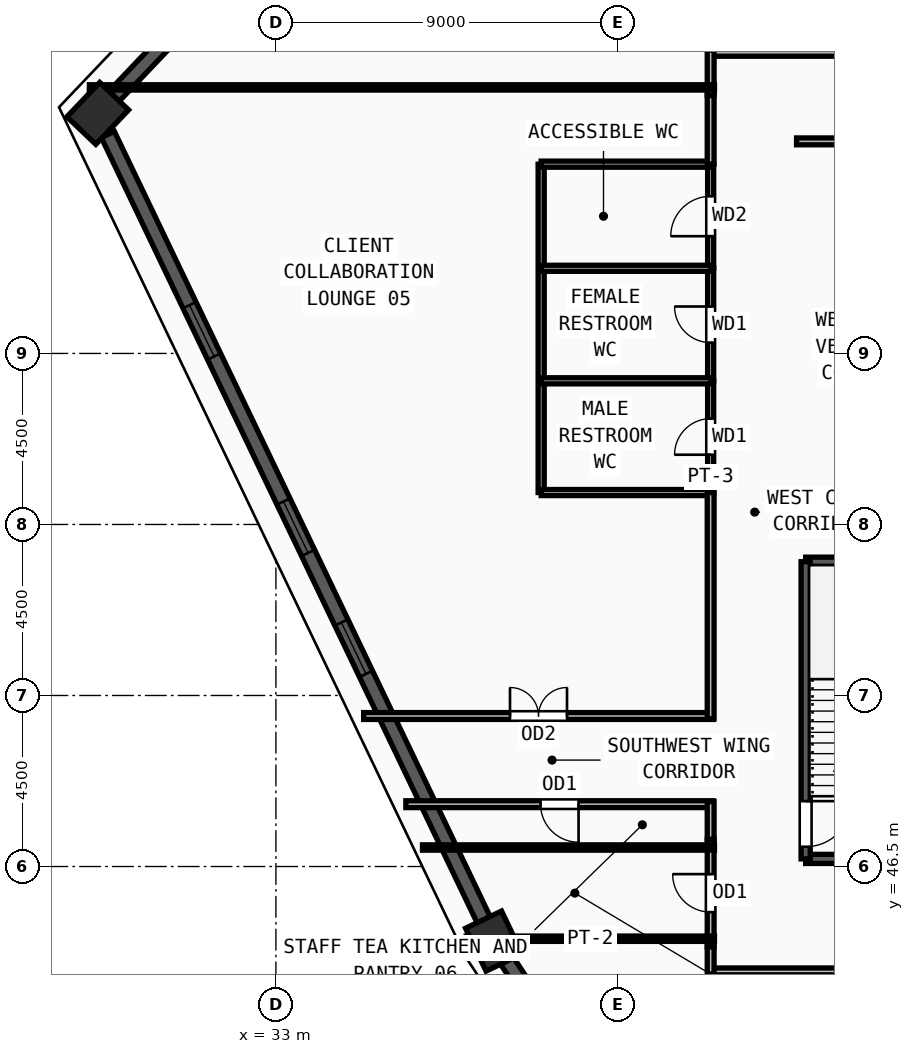
"""IFC4 building model, lengths in metres.
Left out: names, types, materials, properties, quantities, classifications, styles, units other than length and angle.
Written with IfcOpenShell. Run it as: python <this file> out.ifc"""

import sys

from ifc_helpers import new_model, si_unit, direction, frame, frame_2d, origin, origin_2d, place, context, subcontext, project, spatial, rectangle, extrude, source, transform, mapped, element, fill, save


model = new_model("IFC4")
c1 = context("Model", 3, precision=1e-05, world=origin(), true_north=direction((0.0, 1.0)))
c2 = subcontext(c1, "Body", "Model", "MODEL_VIEW")
j1 = project(units=[si_unit("LENGTHUNIT", "METRE"), si_unit("PLANEANGLEUNIT", "RADIAN")], contexts=[c1])
p1 = place(None, origin())
s1 = spatial("IfcSite", under=j1, at=p1, CompositionType="ELEMENT")
p2 = place(p1, origin())
s2 = spatial("IfcBuilding", under=s1, at=p2, CompositionType="ELEMENT")
p3 = place(p2, frame((0.0, 0.0, 258.75)))
s3 = spatial("IfcBuildingStorey", under=s2, at=p3, CompositionType="ELEMENT", Elevation=258.75)
m1 = source(origin(), c2, "Body", "SweptSolid", [
    extrude(rectangle(XDim=1.25, YDim=1.05, at=origin_2d()), origin(), (0.0, 0.0, 1.0), 3.75),
])
for number, where, z_axis, x_axis in (
    (1, (38.734, 44.538, 0.0), (0.0, 0.0, 1.0), (-0.432, 0.902, 0.0)),
    (2, (28.312, 66.317, 0.0), (0.0, 0.0, 1.0), (0.689, 0.724, 0.0)),
):
    element("IfcColumn", number, at=place(p3, frame(where, z_axis=z_axis, x_axis=x_axis)), inside=s3, PredefinedType="COLUMN", context=c2, shape_type="MappedRepresentation", body=[
        mapped(m1, transform((0.0, 0.0, 0.0), x_axis=(1.0, 0.0, 0.0), y_axis=(0.0, 1.0, 0.0), z_axis=(0.0, 0.0, 1.0), scale=1.0)),
    ])
p4 = place(p3, frame((31.559, 69.73, 0.0), z_axis=(0.0, 0.0, 1.0), x_axis=(-0.689302304971, -0.724473831385, 0.0)))
e3 = element("IfcWall", 3, at=p4, inside=s3, PredefinedType="SOLIDWALL", context=c2, shape_type="SweptSolid", body=[
    extrude(rectangle(XDim=4.095, YDim=0.38, at=frame_2d((2.048, 0.0))), origin(), (0.0, 0.0, 1.0), 3.57),
])
p5 = place(p3, frame((28.577, 65.762, 0.0), z_axis=(0.0, 0.0, 1.0), x_axis=(0.431702044432, -0.902016266391, 0.0)))
e4 = element("IfcWall", 4, at=p5, inside=s3, PredefinedType="SOLIDWALL", context=c2, shape_type="SweptSolid", body=[
    extrude(rectangle(XDim=22.914, YDim=0.38, at=frame_2d((11.457, 0.0))), origin(), (0.0, 0.0, 1.0), 3.57),
])
m2 = source(origin(), c2, "Body", "SweptSolid", [
    extrude(rectangle(XDim=1.5, YDim=1.9, at=frame_2d((0.75, 0.95))), frame((0.0, 0.2, 0.0), z_axis=(0.0, -1.0, 0.0), x_axis=(1.0, 0.0, 0.0)), (0.0, 0.0, 1.0), 0.4),
])
p6 = place(p5, frame((4.979, 0.0, 0.55)))
e5 = element("IfcOpeningElement", 5, at=p6, cuts=e4, PredefinedType="OPENING", context=c2, shape_type="MappedRepresentation", body=[
    mapped(m2, transform((0.0, 0.0, 0.0), x_axis=(1.0, 0.0, 0.0), y_axis=(0.0, 1.0, 0.0), z_axis=(0.0, 0.0, 1.0), scale=1.0)),
])
p7 = place(p5, frame((10.707, 0.0, 0.55)))
e6 = element("IfcOpeningElement", 6, at=p7, cuts=e4, PredefinedType="OPENING", context=c2, shape_type="MappedRepresentation", body=[
    mapped(m2, transform((0.0, 0.0, 0.0), x_axis=(1.0, 0.0, 0.0), y_axis=(0.0, 1.0, 0.0), z_axis=(0.0, 0.0, 1.0), scale=1.0)),
])
p8 = place(p5, frame((14.236, 0.0, 0.55)))
e7 = element("IfcOpeningElement", 7, at=p8, cuts=e4, PredefinedType="OPENING", context=c2, shape_type="MappedRepresentation", body=[
    mapped(m2, transform((0.0, 0.0, 0.0), x_axis=(1.0, 0.0, 0.0), y_axis=(0.0, 1.0, 0.0), z_axis=(0.0, 0.0, 1.0), scale=1.0)),
])
p9 = place(p3, frame((39.075, 44.026, 0.0), z_axis=(0.0, 0.0, 1.0), x_axis=(0.554862422202, -0.83194212084, 0.0)))
e8 = element("IfcWall", 8, at=p9, inside=s3, PredefinedType="SOLIDWALL", context=c2, shape_type="SweptSolid", body=[
    extrude(rectangle(XDim=27.782, YDim=0.38, at=frame_2d((13.891, 0.0))), origin(), (0.0, 0.0, 1.0), 3.57),
])
p10 = place(p9, frame((6.195, 0.0, 0.55)))
e9 = element("IfcOpeningElement", 9, at=p10, cuts=e8, PredefinedType="OPENING", context=c2, shape_type="MappedRepresentation", body=[
    mapped(m2, transform((0.0, 0.0, 0.0), x_axis=(1.0, 0.0, 0.0), y_axis=(0.0, 1.0, 0.0), z_axis=(0.0, 0.0, 1.0), scale=1.0)),
])
p11 = place(p9, frame((13.141, 0.0, 0.55)))
e10 = element("IfcOpeningElement", 10, at=p11, cuts=e8, PredefinedType="OPENING", context=c2, shape_type="MappedRepresentation", body=[
    mapped(m2, transform((0.0, 0.0, 0.0), x_axis=(1.0, 0.0, 0.0), y_axis=(0.0, 1.0, 0.0), z_axis=(0.0, 0.0, 1.0), scale=1.0)),
])
p12 = place(p9, frame((20.086, 0.0, 0.55)))
e11 = element("IfcOpeningElement", 11, at=p12, cuts=e8, PredefinedType="OPENING", context=c2, shape_type="MappedRepresentation", body=[
    mapped(m2, transform((0.0, 0.0, 0.0), x_axis=(1.0, 0.0, 0.0), y_axis=(0.0, 1.0, 0.0), z_axis=(0.0, 0.0, 1.0), scale=1.0)),
])
for number, where, z_axis, x_axis in (
    (12, (46.94, 46.7, 0.0), (0.0, 0.0, 1.0), (1.0, 0.0, 0.0)),
    (13, (50.38, 54.52, 0.0), (0.0, 0.0, 1.0), (-1.0, 0.0, 0.0)),
):
    element("IfcWall", number, at=place(p3, frame(where, z_axis=z_axis, x_axis=x_axis)), inside=s3, PredefinedType="SOLIDWALL", context=c2, shape_type="SweptSolid", body=[
        extrude(rectangle(XDim=3.44, YDim=0.24, at=frame_2d((1.72, 0.0))), origin(), (0.0, 0.0, 1.0), 3.57),
    ])
p13 = place(p3, frame((46.94, 54.52, 0.0), z_axis=(0.0, 0.0, 1.0), x_axis=(0.0, -1.0, 0.0)))
e14 = element("IfcWall", 14, at=p13, inside=s3, PredefinedType="SOLIDWALL", context=c2, shape_type="SweptSolid", body=[
    extrude(rectangle(XDim=7.82, YDim=0.24, at=frame_2d((3.91, 0.0))), origin(), (0.0, 0.0, 1.0), 3.57),
])
m3 = source(origin(), c2, "Body", "SweptSolid", [
    extrude(rectangle(XDim=1.2, YDim=2.2, at=frame_2d((0.6, 1.1))), frame((0.0, 0.13, 0.0), z_axis=(0.0, -1.0, 0.0), x_axis=(1.0, 0.0, 0.0)), (0.0, 0.0, 1.0), 0.26),
])
p14 = place(p13, frame((6.3, 0.0, 0.0)))
e15 = element("IfcOpeningElement", 15, at=p14, cuts=e14, PredefinedType="OPENING", context=c2, shape_type="MappedRepresentation", body=[
    mapped(m3, transform((0.0, 0.0, 0.0), x_axis=(1.0, 0.0, 0.0), y_axis=(0.0, 1.0, 0.0), z_axis=(0.0, 0.0, 1.0), scale=1.0)),
])
p15 = place(p3, frame((44.44, 56.34, 0.0), z_axis=(0.0, 0.0, 1.0), x_axis=(0.0, 1.0, 0.0)))
e16 = element("IfcWall", 16, at=p15, inside=s3, PredefinedType="PARTITIONING", context=c2, shape_type="SweptSolid", body=[
    extrude(rectangle(XDim=2.94, YDim=0.16, at=frame_2d((1.47, 0.0))), origin(), (0.0, 0.0, 1.0), 3.57),
])
m4 = source(origin(), c2, "Body", "SweptSolid", [
    extrude(rectangle(XDim=0.95, YDim=2.15, at=frame_2d((0.475, 1.075))), frame((0.0, 0.09, 0.0), z_axis=(0.0, -1.0, 0.0), x_axis=(1.0, 0.0, 0.0)), (0.0, 0.0, 1.0), 0.18),
])
p16 = place(p15, frame((0.995, 0.0, 0.0)))
e17 = element("IfcOpeningElement", 17, at=p16, cuts=e16, PredefinedType="OPENING", context=c2, shape_type="MappedRepresentation", body=[
    mapped(m4, transform((0.0, 0.0, 0.0), x_axis=(1.0, 0.0, 0.0), y_axis=(0.0, 1.0, 0.0), z_axis=(0.0, 0.0, 1.0), scale=1.0)),
])
p17 = place(p3, frame((44.44, 59.28, 0.0), z_axis=(0.0, 0.0, 1.0), x_axis=(0.0, 1.0, 0.0)))
e18 = element("IfcWall", 18, at=p17, inside=s3, PredefinedType="PARTITIONING", context=c2, shape_type="SweptSolid", body=[
    extrude(rectangle(XDim=2.96, YDim=0.16, at=frame_2d((1.48, 0.0))), origin(), (0.0, 0.0, 1.0), 3.57),
])
p18 = place(p17, frame((1.005, 0.0, 0.0)))
e19 = element("IfcOpeningElement", 19, at=p18, cuts=e18, PredefinedType="OPENING", context=c2, shape_type="MappedRepresentation", body=[
    mapped(m4, transform((0.0, 0.0, 0.0), x_axis=(1.0, 0.0, 0.0), y_axis=(0.0, 1.0, 0.0), z_axis=(0.0, 0.0, 1.0), scale=1.0)),
])
p19 = place(p3, frame((44.44, 62.24, 0.0), z_axis=(0.0, 0.0, 1.0), x_axis=(0.0, 1.0, 0.0)))
e20 = element("IfcWall", 20, at=p19, inside=s3, PredefinedType="PARTITIONING", context=c2, shape_type="SweptSolid", body=[
    extrude(rectangle(XDim=2.74, YDim=0.16, at=frame_2d((1.37, 0.0))), origin(), (0.0, 0.0, 1.0), 3.57),
])
m5 = source(origin(), c2, "Body", "SweptSolid", [
    extrude(rectangle(XDim=1.05, YDim=2.15, at=frame_2d((0.525, 1.075))), frame((0.0, 0.09, 0.0), z_axis=(0.0, -1.0, 0.0), x_axis=(1.0, 0.0, 0.0)), (0.0, 0.0, 1.0), 0.18),
])
p20 = place(p19, frame((0.845, 0.0, 0.0)))
e21 = element("IfcOpeningElement", 21, at=p20, cuts=e20, PredefinedType="OPENING", context=c2, shape_type="MappedRepresentation", body=[
    mapped(m5, transform((0.0, 0.0, 0.0), x_axis=(1.0, 0.0, 0.0), y_axis=(0.0, 1.0, 0.0), z_axis=(0.0, 0.0, 1.0), scale=1.0)),
])
p21 = place(p3, frame((46.7, 65.58, 0.0), z_axis=(0.0, 0.0, 1.0), x_axis=(1.0, 0.0, 0.0)))
e22 = element("IfcWall", 22, at=p21, inside=s3, PredefinedType="PARTITIONING", context=c2, shape_type="SweptSolid", body=[
    extrude(rectangle(XDim=3.84, YDim=0.18, at=frame_2d((1.92, 0.0))), origin(), (0.0, 0.0, 1.0), 3.57),
])
m6 = source(origin(), c2, "Body", "SweptSolid", [
    extrude(rectangle(XDim=1.3, YDim=2.2, at=frame_2d((0.65, 1.1))), frame((0.0, 0.1, 0.0), z_axis=(0.0, -1.0, 0.0), x_axis=(1.0, 0.0, 0.0)), (0.0, 0.0, 1.0), 0.2),
])
p22 = place(p21, frame((1.27, 0.0, 0.0)))
e23 = element("IfcOpeningElement", 23, at=p22, cuts=e22, PredefinedType="OPENING", context=c2, shape_type="MappedRepresentation", body=[
    mapped(m6, transform((0.0, 0.0, 0.0), x_axis=(1.0, 0.0, 0.0), y_axis=(0.0, 1.0, 0.0), z_axis=(0.0, 0.0, 1.0), scale=1.0)),
])
p23 = place(p3, frame((44.37, 67.91, 0.0), z_axis=(0.0, 0.0, 1.0), x_axis=(1.0, 0.0, 0.0)))
e24 = element("IfcWall", 24, at=p23, inside=s3, PredefinedType="PARTITIONING", context=c2, shape_type="SweptSolid", body=[
    extrude(rectangle(XDim=18.84, YDim=0.18, at=frame_2d((9.42, 0.0))), origin(), (0.0, 0.0, 1.0), 3.205),
])
m7 = source(origin(), c2, "Body", "SweptSolid", [
    extrude(rectangle(XDim=1.5, YDim=2.2, at=frame_2d((0.75, 1.1))), frame((0.0, 0.1, 0.0), z_axis=(0.0, -1.0, 0.0), x_axis=(1.0, 0.0, 0.0)), (0.0, 0.0, 1.0), 0.2),
])
p24 = place(p23, frame((8.67, 0.0, 0.0)))
e25 = element("IfcOpeningElement", 25, at=p24, cuts=e24, PredefinedType="OPENING", context=c2, shape_type="MappedRepresentation", body=[
    mapped(m7, transform((0.0, 0.0, 0.0), x_axis=(1.0, 0.0, 0.0), y_axis=(0.0, 1.0, 0.0), z_axis=(0.0, 0.0, 1.0), scale=1.0)),
])
p25 = place(p3, frame((35.309, 50.46, 0.0), z_axis=(0.0, 0.0, 1.0), x_axis=(1.0, 0.0, 0.0)))
e26 = element("IfcWall", 26, at=p25, inside=s3, PredefinedType="PARTITIONING", context=c2, shape_type="SweptSolid", body=[
    extrude(rectangle(XDim=9.201, YDim=0.18, at=frame_2d((4.601, 0.0))), origin(), (0.0, 0.0, 1.0), 3.57),
])
p26 = place(p25, frame((3.851, 0.0, 0.0)))
e27 = element("IfcOpeningElement", 27, at=p26, cuts=e26, PredefinedType="OPENING", context=c2, shape_type="MappedRepresentation", body=[
    mapped(m7, transform((0.0, 0.0, 0.0), x_axis=(1.0, 0.0, 0.0), y_axis=(0.0, 1.0, 0.0), z_axis=(0.0, 0.0, 1.0), scale=1.0)),
])
p27 = place(p3, frame((44.51, 48.14, 0.0), z_axis=(0.0, 0.0, 1.0), x_axis=(-1.0, 0.0, 0.0)))
e28 = element("IfcWall", 28, at=p27, inside=s3, PredefinedType="PARTITIONING", context=c2, shape_type="SweptSolid", body=[
    extrude(rectangle(XDim=8.091, YDim=0.18, at=frame_2d((4.045, 0.0))), origin(), (0.0, 0.0, 1.0), 3.57),
])
m8 = source(origin(), c2, "Body", "SweptSolid", [
    extrude(rectangle(XDim=1.0, YDim=2.2, at=frame_2d((0.5, 1.1))), frame((0.0, 0.1, 0.0), z_axis=(0.0, -1.0, 0.0), x_axis=(1.0, 0.0, 0.0)), (0.0, 0.0, 1.0), 0.2),
])
p28 = place(p27, frame((3.546, 0.0, 0.0)))
e29 = element("IfcOpeningElement", 29, at=p28, cuts=e28, PredefinedType="OPENING", context=c2, shape_type="MappedRepresentation", body=[
    mapped(m8, transform((0.0, 0.0, 0.0), x_axis=(1.0, 0.0, 0.0), y_axis=(0.0, 1.0, 0.0), z_axis=(0.0, 0.0, 1.0), scale=1.0)),
])
p29 = place(p3, frame((44.44, 44.385, 0.0), z_axis=(0.0, 0.0, 1.0), x_axis=(0.0, 1.0, 0.0)))
e30 = element("IfcWall", 30, at=p29, inside=s3, PredefinedType="PARTITIONING", context=c2, shape_type="SweptSolid", body=[
    extrude(rectangle(XDim=2.83, YDim=0.18, at=frame_2d((1.415, 0.0))), origin(), (0.0, 0.0, 1.0), 3.57),
])
p30 = place(p29, frame((0.915, 0.0, 0.0)))
e31 = element("IfcOpeningElement", 31, at=p30, cuts=e30, PredefinedType="OPENING", context=c2, shape_type="MappedRepresentation", body=[
    mapped(m8, transform((0.0, 0.0, 0.0), x_axis=(1.0, 0.0, 0.0), y_axis=(0.0, 1.0, 0.0), z_axis=(0.0, 0.0, 1.0), scale=1.0)),
])
p31 = place(p3, frame((75.63, 43.74, 0.0), z_axis=(0.0, 0.0, 1.0), x_axis=(-1.0, 0.0, 0.0)))
e32 = element("IfcWall", 32, at=p31, inside=s3, PredefinedType="PARTITIONING", context=c2, shape_type="SweptSolid", body=[
    extrude(rectangle(XDim=31.26, YDim=0.18, at=frame_2d((15.63, 0.0))), origin(), (0.0, 0.0, 1.0), 3.57),
])
p32 = place(p31, frame((10.38, 0.0, 0.0)))
e33 = element("IfcOpeningElement", 33, at=p32, cuts=e32, PredefinedType="OPENING", context=c2, shape_type="MappedRepresentation", body=[
    mapped(m7, transform((0.0, 0.0, 0.0), x_axis=(1.0, 0.0, 0.0), y_axis=(0.0, 1.0, 0.0), z_axis=(0.0, 0.0, 1.0), scale=1.0)),
])
p33 = place(p3, frame((39.98, 56.34, 0.0), z_axis=(0.0, 0.0, 1.0), x_axis=(0.0, 1.0, 0.0)))
e34 = element("IfcWall", 34, at=p33, inside=s3, PredefinedType="PARTITIONING", context=c2, shape_type="SweptSolid", body=[
    extrude(rectangle(XDim=8.64, YDim=0.16, at=frame_2d((4.32, 0.0))), origin(), (0.0, 0.0, 1.0), 3.57),
])
for number, where, z_axis, x_axis in (
    (35, (39.98, 56.34, 0.0), (0.0, 0.0, 1.0), (1.0, 0.0, 0.0)),
    (36, (39.98, 59.28, 0.0), (0.0, 0.0, 1.0), (1.0, 0.0, 0.0)),
    (37, (39.98, 62.24, 0.0), (0.0, 0.0, 1.0), (1.0, 0.0, 0.0)),
    (38, (39.98, 64.98, 0.0), (0.0, 0.0, 1.0), (1.0, 0.0, 0.0)),
):
    element("IfcWall", number, at=place(p3, frame(where, z_axis=z_axis, x_axis=x_axis)), inside=s3, PredefinedType="PARTITIONING", context=c2, shape_type="SweptSolid", body=[
        extrude(rectangle(XDim=4.46, YDim=0.16, at=frame_2d((2.23, 0.0))), origin(), (0.0, 0.0, 1.0), 3.57),
    ])
p34 = place(p3, frame((44.44, 66.785, 0.0), z_axis=(0.0, 0.0, 1.0), x_axis=(0.0, 1.0, 0.0)))
e39 = element("IfcWall", 39, at=p34, inside=s3, PredefinedType="PARTITIONING", context=c2, shape_type="SweptSolid", body=[
    extrude(rectangle(XDim=1.195, YDim=0.18, at=frame_2d((0.598, 0.0))), origin(), (0.0, 0.0, 1.0), 3.57),
])
p35 = place(p3, frame((44.44, 50.39, 0.0), z_axis=(0.0, 0.0, 1.0), x_axis=(0.0, 1.0, 0.0)))
e40 = element("IfcWall", 40, at=p35, inside=s3, PredefinedType="PARTITIONING", context=c2, shape_type="SweptSolid", body=[
    extrude(rectangle(XDim=5.95, YDim=0.18, at=frame_2d((2.975, 0.0))), origin(), (0.0, 0.0, 1.0), 3.205),
])
p36 = place(p3, frame((44.44, 64.98, 0.0), z_axis=(0.0, 0.0, 1.0), x_axis=(0.0, 1.0, 0.0)))
e41 = element("IfcWall", 41, at=p36, inside=s3, PredefinedType="PARTITIONING", context=c2, shape_type="SweptSolid", body=[
    extrude(rectangle(XDim=1.805, YDim=0.18, at=frame_2d((0.902, 0.0))), origin(), (0.0, 0.0, 1.0), 3.57),
])
p37 = place(p3, frame((44.44, 47.215, 0.0), z_axis=(0.0, 0.0, 1.0), x_axis=(0.0, 1.0, 0.0)))
e42 = element("IfcWall", 42, at=p37, inside=s3, PredefinedType="PARTITIONING", context=c2, shape_type="SweptSolid", body=[
    extrude(rectangle(XDim=0.995, YDim=0.18, at=frame_2d((0.498, 0.0))), origin(), (0.0, 0.0, 1.0), 3.57),
])
p38 = place(p3, frame((44.44, 43.67, 0.0), z_axis=(0.0, 0.0, 1.0), x_axis=(0.0, 1.0, 0.0)))
e43 = element("IfcWall", 43, at=p38, inside=s3, PredefinedType="PARTITIONING", context=c2, shape_type="SweptSolid", body=[
    extrude(rectangle(XDim=0.715, YDim=0.18, at=frame_2d((0.357, 0.0))), origin(), (0.0, 0.0, 1.0), 3.57),
])
p39 = place(p3, frame((44.54, 44.6, 0.0), z_axis=(0.0, 0.0, 1.0), x_axis=(-1.0, 0.0, 0.0)))
e44 = element("IfcWall", 44, at=p39, inside=s3, PredefinedType="PARTITIONING", context=c2, shape_type="SweptSolid", body=[
    extrude(rectangle(XDim=6.534, YDim=0.14, at=frame_2d((3.267, 0.0))), origin(), (0.0, 0.0, 1.0), 3.57),
])
p40 = place(p3, frame((44.54, 47.0, 0.0), z_axis=(0.0, 0.0, 1.0), x_axis=(-1.0, 0.0, 0.0)))
e45 = element("IfcWall", 45, at=p40, inside=s3, PredefinedType="PARTITIONING", context=c2, shape_type="SweptSolid", body=[
    extrude(rectangle(XDim=7.683, YDim=0.14, at=frame_2d((3.842, 0.0))), origin(), (0.0, 0.0, 1.0), 3.57),
])
p41 = place(p3, frame((44.54, 67.0, 0.0), z_axis=(0.0, 0.0, 1.0), x_axis=(-1.0, 0.0, 0.0)))
e46 = element("IfcWall", 46, at=p41, inside=s3, PredefinedType="PARTITIONING", context=c2, shape_type="SweptSolid", body=[
    extrude(rectangle(XDim=16.449, YDim=0.14, at=frame_2d((8.225, 0.0))), origin(), (0.0, 0.0, 1.0), 3.57),
])
m9 = source(origin(), c2, "Body", "SweptSolid", [
    extrude(rectangle(XDim=1.5, YDim=1.9, at=frame_2d((0.75, 0.95))), frame((0.0, 0.03, 0.0), z_axis=(0.0, -1.0, 0.0), x_axis=(1.0, 0.0, 0.0)), (0.0, 0.0, 1.0), 0.06),
])
p42 = place(p6, origin())
e47 = element("IfcWindow", 47, at=p42, inside=s3, PartitioningType="DOUBLE_PANEL_VERTICAL", PredefinedType="WINDOW", context=c2, shape_type="MappedRepresentation", body=[
    mapped(m9, transform((0.0, 0.0, 0.0), x_axis=(1.0, 0.0, 0.0), y_axis=(0.0, 1.0, 0.0), z_axis=(0.0, 0.0, 1.0), scale=1.0)),
])
fill(e5, e47)
p43 = place(p7, origin())
e48 = element("IfcWindow", 48, at=p43, inside=s3, PartitioningType="DOUBLE_PANEL_VERTICAL", PredefinedType="WINDOW", context=c2, shape_type="MappedRepresentation", body=[
    mapped(m9, transform((0.0, 0.0, 0.0), x_axis=(1.0, 0.0, 0.0), y_axis=(0.0, 1.0, 0.0), z_axis=(0.0, 0.0, 1.0), scale=1.0)),
])
fill(e6, e48)
p44 = place(p8, origin())
e49 = element("IfcWindow", 49, at=p44, inside=s3, PartitioningType="DOUBLE_PANEL_VERTICAL", PredefinedType="WINDOW", context=c2, shape_type="MappedRepresentation", body=[
    mapped(m9, transform((0.0, 0.0, 0.0), x_axis=(1.0, 0.0, 0.0), y_axis=(0.0, 1.0, 0.0), z_axis=(0.0, 0.0, 1.0), scale=1.0)),
])
fill(e7, e49)
m10 = source(origin(), c2, "Body", "SweptSolid", [
    extrude(rectangle(XDim=1.2, YDim=2.2, at=frame_2d((0.6, 1.1))), frame((0.0, 0.025, 0.0), z_axis=(0.0, -1.0, 0.0), x_axis=(1.0, 0.0, 0.0)), (0.0, 0.0, 1.0), 0.05),
])
p45 = place(p14, origin())
e50 = element("IfcDoor", 50, at=p45, inside=s3, OperationType="SINGLE_SWING_LEFT", PredefinedType="DOOR", context=c2, shape_type="MappedRepresentation", body=[
    mapped(m10, transform((0.0, 0.0, 0.0), x_axis=(1.0, 0.0, 0.0), y_axis=(0.0, 1.0, 0.0), z_axis=(0.0, 0.0, 1.0), scale=1.0)),
])
fill(e15, e50)
m11 = source(origin(), c2, "Body", "SweptSolid", [
    extrude(rectangle(XDim=0.95, YDim=2.15, at=frame_2d((0.475, 1.075))), frame((0.0, 0.025, 0.0), z_axis=(0.0, -1.0, 0.0), x_axis=(1.0, 0.0, 0.0)), (0.0, 0.0, 1.0), 0.05),
])
p46 = place(p16, origin())
e51 = element("IfcDoor", 51, at=p46, inside=s3, OperationType="SINGLE_SWING_LEFT", PredefinedType="DOOR", context=c2, shape_type="MappedRepresentation", body=[
    mapped(m11, transform((0.0, 0.0, 0.0), x_axis=(1.0, 0.0, 0.0), y_axis=(0.0, 1.0, 0.0), z_axis=(0.0, 0.0, 1.0), scale=1.0)),
])
fill(e17, e51)
p47 = place(p18, origin())
e52 = element("IfcDoor", 52, at=p47, inside=s3, OperationType="SINGLE_SWING_RIGHT", PredefinedType="DOOR", context=c2, shape_type="MappedRepresentation", body=[
    mapped(m11, transform((0.0, 0.0, 0.0), x_axis=(1.0, 0.0, 0.0), y_axis=(0.0, 1.0, 0.0), z_axis=(0.0, 0.0, 1.0), scale=1.0)),
])
fill(e19, e52)
m12 = source(origin(), c2, "Body", "SweptSolid", [
    extrude(rectangle(XDim=1.05, YDim=2.15, at=frame_2d((0.525, 1.075))), frame((0.0, 0.025, 0.0), z_axis=(0.0, -1.0, 0.0), x_axis=(1.0, 0.0, 0.0)), (0.0, 0.0, 1.0), 0.05),
])
p48 = place(p20, origin())
e53 = element("IfcDoor", 53, at=p48, inside=s3, OperationType="SINGLE_SWING_LEFT", PredefinedType="DOOR", context=c2, shape_type="MappedRepresentation", body=[
    mapped(m12, transform((0.0, 0.0, 0.0), x_axis=(1.0, 0.0, 0.0), y_axis=(0.0, 1.0, 0.0), z_axis=(0.0, 0.0, 1.0), scale=1.0)),
])
fill(e21, e53)
m13 = source(origin(), c2, "Body", "SweptSolid", [
    extrude(rectangle(XDim=1.5, YDim=2.2, at=frame_2d((0.75, 1.1))), frame((0.0, 0.025, 0.0), z_axis=(0.0, -1.0, 0.0), x_axis=(1.0, 0.0, 0.0)), (0.0, 0.0, 1.0), 0.05),
])
p49 = place(p26, origin())
e54 = element("IfcDoor", 54, at=p49, inside=s3, OperationType="DOUBLE_DOOR_SINGLE_SWING", PredefinedType="DOOR", context=c2, shape_type="MappedRepresentation", body=[
    mapped(m13, transform((0.0, 0.0, 0.0), x_axis=(1.0, 0.0, 0.0), y_axis=(0.0, 1.0, 0.0), z_axis=(0.0, 0.0, 1.0), scale=1.0)),
])
fill(e27, e54)
m14 = source(origin(), c2, "Body", "SweptSolid", [
    extrude(rectangle(XDim=1.0, YDim=2.2, at=frame_2d((0.5, 1.1))), frame((0.0, 0.025, 0.0), z_axis=(0.0, -1.0, 0.0), x_axis=(1.0, 0.0, 0.0)), (0.0, 0.0, 1.0), 0.05),
])
p50 = place(p28, origin())
e55 = element("IfcDoor", 55, at=p50, inside=s3, OperationType="SINGLE_SWING_LEFT", PredefinedType="DOOR", context=c2, shape_type="MappedRepresentation", body=[
    mapped(m14, transform((0.0, 0.0, 0.0), x_axis=(1.0, 0.0, 0.0), y_axis=(0.0, 1.0, 0.0), z_axis=(0.0, 0.0, 1.0), scale=1.0)),
])
fill(e29, e55)
p51 = place(p30, origin())
e56 = element("IfcDoor", 56, at=p51, inside=s3, OperationType="SINGLE_SWING_RIGHT", PredefinedType="DOOR", context=c2, shape_type="MappedRepresentation", body=[
    mapped(m14, transform((0.0, 0.0, 0.0), x_axis=(1.0, 0.0, 0.0), y_axis=(0.0, 1.0, 0.0), z_axis=(0.0, 0.0, 1.0), scale=1.0)),
])
fill(e31, e56)
save(model, sys.argv[1])
